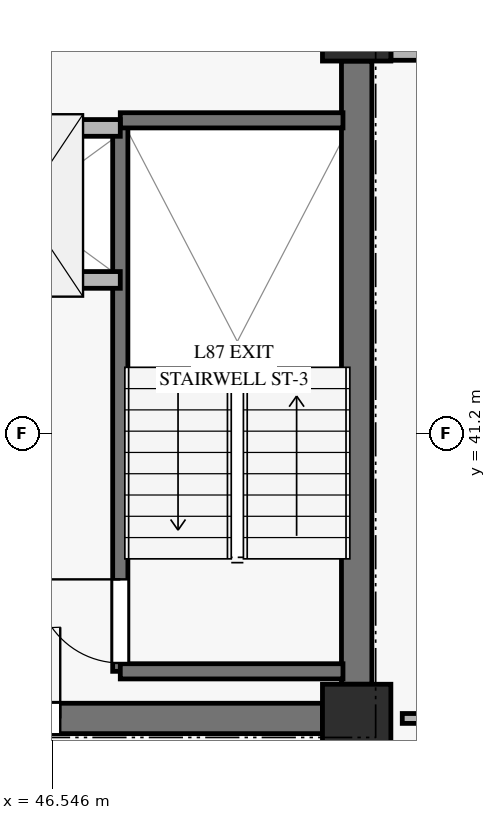
"""IFC4 building model, lengths in metres.
Left out: names, types, materials, properties, quantities, classifications, styles, units other than length and angle.
Written with IfcOpenShell. Run it as: python <this file> out.ifc"""

import sys

from ifc_helpers import new_model, si_unit, direction, frame, frame_2d, origin, origin_2d, place, context, subcontext, project, spatial, rectangle, extrude, source, transform, mapped, element, fill, save


model = new_model("IFC4")
c1 = context("Model", 3, precision=1e-05, world=origin(), true_north=direction((0.0, 1.0)))
c2 = subcontext(c1, "Body", "Model", "MODEL_VIEW")
j1 = project(units=[si_unit("LENGTHUNIT", "METRE"), si_unit("PLANEANGLEUNIT", "RADIAN")], contexts=[c1])
p1 = place(None, origin())
s1 = spatial("IfcSite", under=j1, at=p1, CompositionType="ELEMENT")
p2 = place(p1, origin())
s2 = spatial("IfcBuilding", under=s1, at=p2, CompositionType="ELEMENT")
p3 = place(p2, frame((0.0, 0.0, 335.7)))
s3 = spatial("IfcBuildingStorey", under=s2, at=p3, CompositionType="ELEMENT", Elevation=335.7)
m1 = source(origin(), c2, "Body", "SweptSolid", [
    extrude(rectangle(XDim=0.9, YDim=0.9, at=origin_2d()), origin(), (0.0, 0.0, 1.0), 3.185),
])
for number, where, z_axis, x_axis in (
    (1, (50.55, 37.45, 0.0), (0.0, 0.0, 1.0), (1.0, 0.0, 0.0)),
    (2, (50.55, 46.55, 0.0), (0.0, 0.0, 1.0), (1.0, 0.0, 0.0)),
):
    element("IfcColumn", number, at=place(p3, frame(where, z_axis=z_axis, x_axis=x_axis)), inside=s3, PredefinedType="PILASTER", context=c2, shape_type="MappedRepresentation", body=[
        mapped(m1, transform((0.0, 0.0, 0.0), x_axis=(1.0, 0.0, 0.0), y_axis=(0.0, 1.0, 0.0), z_axis=(0.0, 0.0, 1.0), scale=1.0)),
    ])
p4 = place(p3, frame((44.75, 37.45, 0.0), z_axis=(0.0, 0.0, 1.0), x_axis=(1.0, 0.0, 0.0)))
e3 = element("IfcWall", 3, at=p4, inside=s3, PredefinedType="SHEAR", context=c2, shape_type="SweptSolid", body=[
    extrude(rectangle(XDim=5.35, YDim=0.4, at=frame_2d((2.675, 0.0))), origin(), (0.0, 0.0, 1.0), 3.185),
])
p5 = place(p4, frame((0.7, 0.0, 0.0)))
e4 = element("IfcOpeningElement", 4, at=p5, cuts=e3, PredefinedType="OPENING", context=c2, shape_type="SweptSolid", body=[
    extrude(rectangle(XDim=1.2, YDim=2.15, at=frame_2d((0.6, 1.075))), frame((0.0, 0.21, 0.0), z_axis=(0.0, -1.0, 0.0), x_axis=(1.0, 0.0, 0.0)), (0.0, 0.0, 1.0), 0.42),
])
p6 = place(p3, frame((50.55, 37.9, 0.0), z_axis=(0.0, 0.0, 1.0), x_axis=(0.0, 1.0, 0.0)))
e5 = element("IfcWall", 5, at=p6, inside=s3, PredefinedType="SHEAR", context=c2, shape_type="SweptSolid", body=[
    extrude(rectangle(XDim=8.2, YDim=0.4, at=frame_2d((4.1, 0.0))), origin(), (0.0, 0.0, 1.0), 3.185),
])
p7 = place(p3, frame((51.0, 46.25, 0.0), z_axis=(0.0, 0.0, 1.0), x_axis=(1.0, 0.0, 0.0)))
e6 = element("IfcWall", 6, at=p7, inside=s3, PredefinedType="SOLIDWALL", context=c2, shape_type="SweptSolid", body=[
    extrude(rectangle(XDim=5.269, YDim=0.28, at=frame_2d((2.635, 0.0))), origin(), (0.0, 0.0, 1.0), 2.815),
])
p8 = place(p7, frame((1.834, 0.0, 0.45)))
e7 = element("IfcOpeningElement", 7, at=p8, cuts=e6, PredefinedType="OPENING", context=c2, shape_type="SweptSolid", body=[
    extrude(rectangle(XDim=1.6, YDim=2.0, at=frame_2d((0.8, 1.0))), frame((0.0, 0.15, 0.0), z_axis=(0.0, -1.0, 0.0), x_axis=(1.0, 0.0, 0.0)), (0.0, 0.0, 1.0), 0.3),
])
p9 = place(p3, frame((47.44, 38.07, 0.0), z_axis=(0.0, 0.0, 1.0), x_axis=(0.0, 1.0, 0.0)))
e8 = element("IfcWall", 8, at=p9, inside=s3, PredefinedType="SOLIDWALL", context=c2, shape_type="SweptSolid", body=[
    extrude(rectangle(XDim=7.25, YDim=0.2, at=frame_2d((3.625, 0.0))), origin(), (0.0, 0.0, 1.0), 3.4),
])
p10 = place(p9, frame((0.11, 0.0, 0.0)))
e9 = element("IfcOpeningElement", 9, at=p10, cuts=e8, PredefinedType="OPENING", context=c2, shape_type="SweptSolid", body=[
    extrude(rectangle(XDim=1.1, YDim=2.15, at=frame_2d((0.55, 1.075))), frame((0.0, 0.11, 0.0), z_axis=(0.0, -1.0, 0.0), x_axis=(1.0, 0.0, 0.0)), (0.0, 0.0, 1.0), 0.22),
])
for number, where, z_axis, x_axis in (
    (10, (47.44, 45.32, 0.0), (0.0, 0.0, 1.0), (1.0, 0.0, 0.0)),
    (11, (47.44, 38.07, 0.0), (0.0, 0.0, 1.0), (1.0, 0.0, 0.0)),
):
    element("IfcWall", number, at=place(p3, frame(where, z_axis=z_axis, x_axis=x_axis)), inside=s3, PredefinedType="SOLIDWALL", context=c2, shape_type="SweptSolid", body=[
        extrude(rectangle(XDim=2.93, YDim=0.2, at=frame_2d((1.465, 0.0))), origin(), (0.0, 0.0, 1.0), 3.4),
    ])
p11 = place(p3, frame((44.72, 43.22, 0.0), z_axis=(0.0, 0.0, 1.0), x_axis=(1.0, 0.0, 0.0)))
e12 = element("IfcWall", 12, at=p11, inside=s3, PredefinedType="SOLIDWALL", context=c2, shape_type="SweptSolid", body=[
    extrude(rectangle(XDim=2.72, YDim=0.22, at=frame_2d((1.36, 0.0))), origin(), (0.0, 0.0, 1.0), 3.185),
])
p12 = place(p11, frame((0.7, 0.0, 0.0)))
e13 = element("IfcOpeningElement", 13, at=p12, cuts=e12, PredefinedType="OPENING", context=c2, shape_type="SweptSolid", body=[
    extrude(rectangle(XDim=1.1, YDim=2.2, at=frame_2d((0.55, 1.1))), frame((0.0, 0.12, 0.0), z_axis=(0.0, -1.0, 0.0), x_axis=(1.0, 0.0, 0.0)), (0.0, 0.0, 1.0), 0.24),
])
p13 = place(p3, frame((44.72, 45.22, 0.0), z_axis=(0.0, 0.0, 1.0), x_axis=(1.0, 0.0, 0.0)))
e14 = element("IfcWall", 14, at=p13, inside=s3, PredefinedType="SOLIDWALL", context=c2, shape_type="SweptSolid", body=[
    extrude(rectangle(XDim=2.72, YDim=0.22, at=frame_2d((1.36, 0.0))), origin(), (0.0, 0.0, 1.0), 3.185),
])
p14 = place(p3, frame((51.15, 37.45, 0.0), z_axis=(0.0, 0.0, 1.0), x_axis=(1.0, 0.0, 0.0)))
e15 = element("IfcWall", 15, at=p14, inside=s3, PredefinedType="PARTITIONING", context=c2, shape_type="SweptSolid", body=[
    extrude(rectangle(XDim=7.565, YDim=0.13, at=frame_2d((3.783, 0.0))), origin(), (0.0, 0.0, 1.0), 2.82),
])
p15 = place(p14, frame((0.5, 0.0, 0.0)))
e16 = element("IfcOpeningElement", 16, at=p15, cuts=e15, PredefinedType="OPENING", context=c2, shape_type="SweptSolid", body=[
    extrude(rectangle(XDim=0.9, YDim=2.1, at=frame_2d((0.45, 1.05))), frame((0.0, 0.075, 0.0), z_axis=(0.0, -1.0, 0.0), x_axis=(1.0, 0.0, 0.0)), (0.0, 0.0, 1.0), 0.15),
])
p16 = place(p14, frame((5.735, 0.0, 0.0)))
e17 = element("IfcOpeningElement", 17, at=p16, cuts=e15, PredefinedType="OPENING", context=c2, shape_type="SweptSolid", body=[
    extrude(rectangle(XDim=0.95, YDim=2.1, at=frame_2d((0.475, 1.05))), frame((0.0, 0.075, 0.0), z_axis=(0.0, -1.0, 0.0), x_axis=(1.0, 0.0, 0.0)), (0.0, 0.0, 1.0), 0.15),
])
m2 = source(origin(), c2, "Body", "SweptSolid", [
    extrude(rectangle(XDim=1.1, YDim=2.15, at=frame_2d((0.55, 1.075))), frame((0.0, 0.025, 0.0), z_axis=(0.0, -1.0, 0.0), x_axis=(1.0, 0.0, 0.0)), (0.0, 0.0, 1.0), 0.05),
])
p17 = place(p10, origin())
e18 = element("IfcDoor", 18, at=p17, inside=s3, OperationType="SINGLE_SWING_RIGHT", PredefinedType="DOOR", context=c2, shape_type="MappedRepresentation", body=[
    mapped(m2, transform((0.0, 0.0, 0.0), x_axis=(1.0, 0.0, 0.0), y_axis=(0.0, 1.0, 0.0), z_axis=(0.0, 0.0, 1.0), scale=1.0)),
])
fill(e9, e18)
m3 = source(origin(), c2, "Body", "SweptSolid", [
    extrude(rectangle(XDim=1.2, YDim=2.15, at=frame_2d((0.6, 1.075))), frame((0.0, 0.025, 0.0), z_axis=(0.0, -1.0, 0.0), x_axis=(1.0, 0.0, 0.0)), (0.0, 0.0, 1.0), 0.05),
])
p18 = place(p5, origin())
e19 = element("IfcDoor", 19, at=p18, inside=s3, OperationType="SINGLE_SWING_RIGHT", PredefinedType="DOOR", context=c2, shape_type="MappedRepresentation", body=[
    mapped(m3, transform((0.0, 0.0, 0.0), x_axis=(1.0, 0.0, 0.0), y_axis=(0.0, 1.0, 0.0), z_axis=(0.0, 0.0, 1.0), scale=1.0)),
])
fill(e4, e19)
save(model, sys.argv[1])
